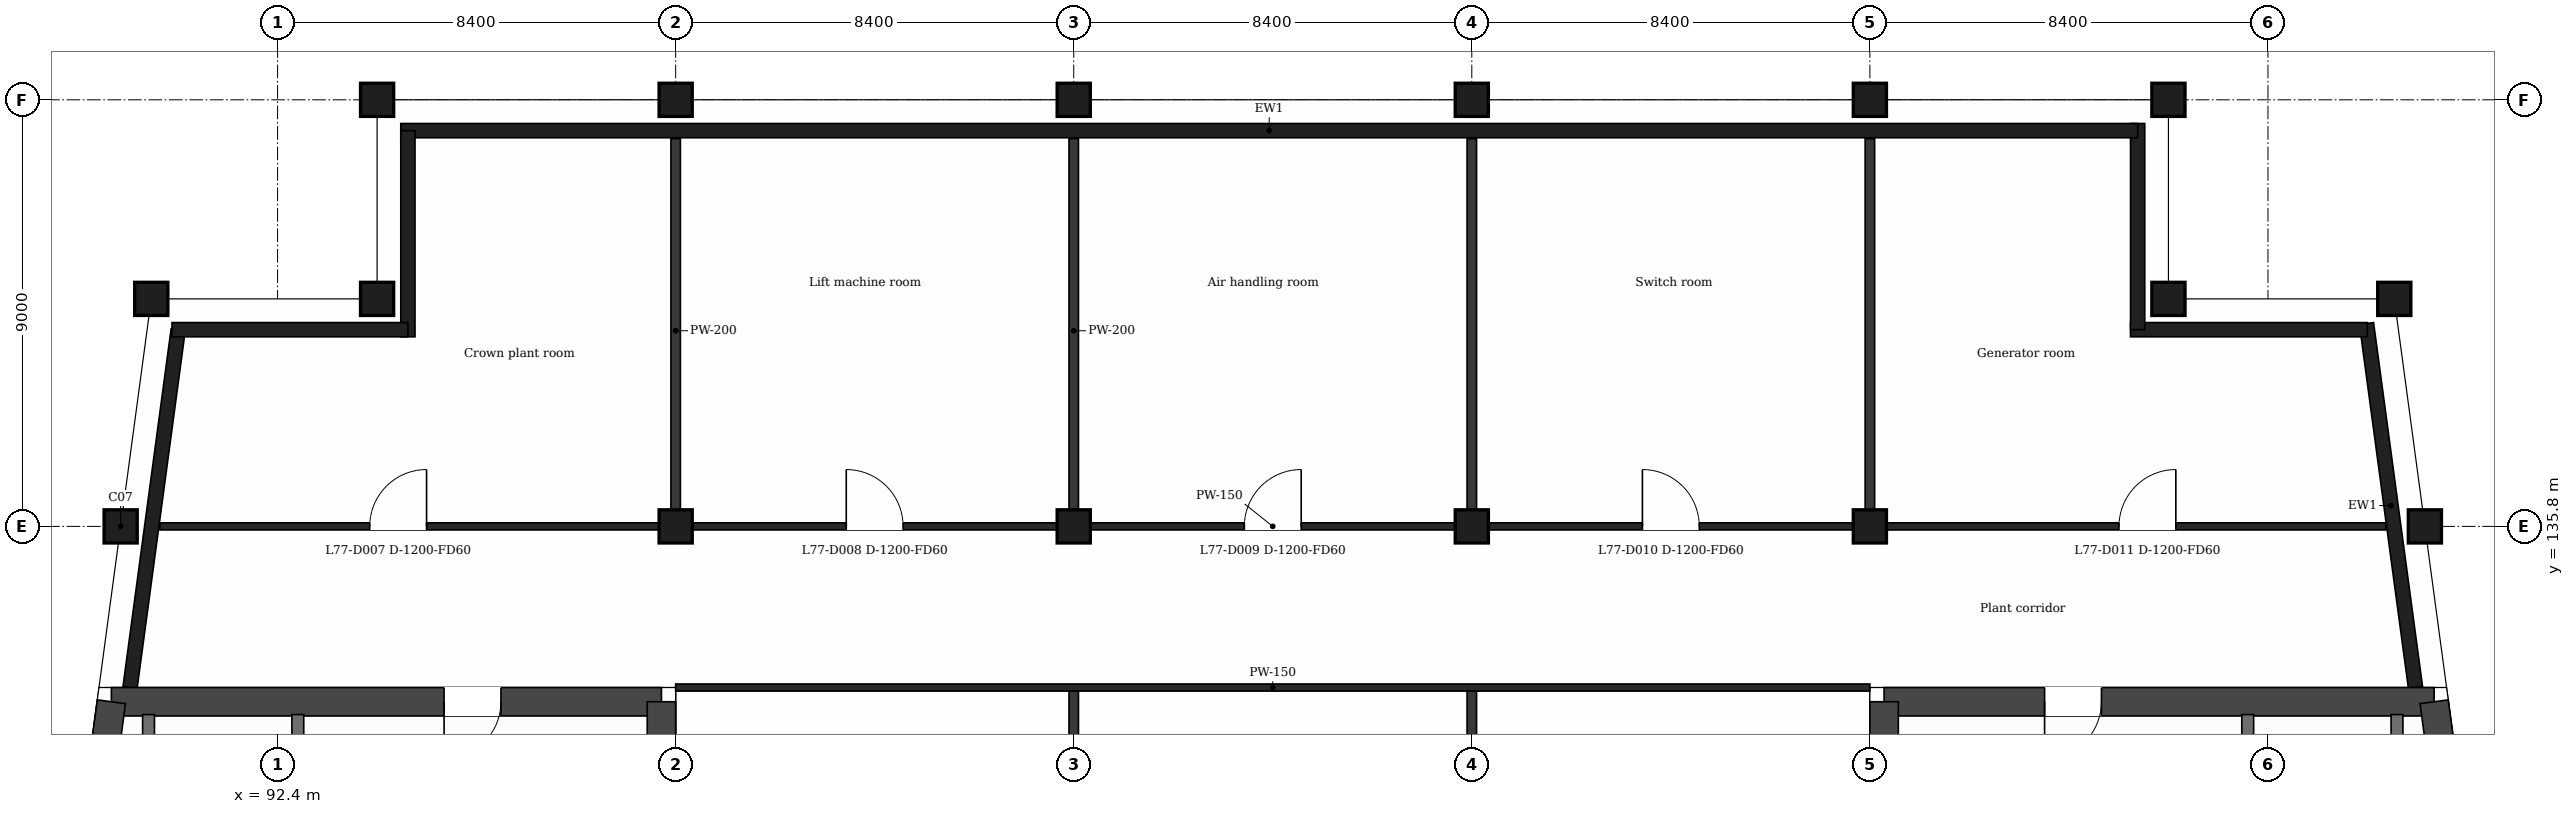
"""IFC4 building model, lengths in metres.
Left out: names, types, materials, properties, quantities, classifications, styles, units other than length and angle.
Written with IfcOpenShell. Run it as: python <this file> out.ifc"""

import sys

from ifc_helpers import new_model, si_unit, direction, frame, frame_2d, origin, origin_2d, place, context, subcontext, project, spatial, polyline, rectangle, outline, extrude, element, fill, save


model = new_model("IFC4")
c1 = context("Model", 3, precision=1e-05, world=origin(), true_north=direction((0.0, 1.0)))
c2 = subcontext(c1, "Body", "Model", "MODEL_VIEW")
j1 = project(units=[si_unit("LENGTHUNIT", "METRE"), si_unit("PLANEANGLEUNIT", "RADIAN")], contexts=[c1])
p1 = place(None, origin())
s1 = spatial("IfcSite", under=j1, at=p1, CompositionType="ELEMENT")
p2 = place(p1, origin())
s2 = spatial("IfcBuilding", under=s1, at=p2, CompositionType="ELEMENT")
p3 = place(p2, frame((0.0, 0.0, 319.9)))
s3 = spatial("IfcBuildingStorey", under=s2, at=p3, CompositionType="ELEMENT", Elevation=319.9)
p4 = place(p3, frame((88.893, 132.1, 0.0), z_axis=(0.0, 0.0, 1.0), x_axis=(1.0, 0.0, 0.0)))
e1 = element("IfcWall", 1, at=p4, inside=s3, PredefinedType="SHEAR", context=c2, shape_type="SweptSolid", body=[
    extrude(outline(polyline([(0.0, 0.0), (11.607, 0.0), (11.607, 9.665), (0.0, 9.665), (0.0, 0.0)])), frame((0.0, 0.3, 0.0), z_axis=(0.0, -1.0, 0.0), x_axis=(1.0, 0.0, 0.0)), (0.0, 0.0, 1.0), 0.6),
])
p5 = place(p4, frame((7.021, 0.0, 0.0)))
e2 = element("IfcOpeningElement", 2, at=p5, cuts=e1, PredefinedType="OPENING", context=c2, shape_type="SweptSolid", body=[
    extrude(rectangle(XDim=1.2, YDim=2.1, at=frame_2d((0.6, 1.05))), frame((0.0, 0.31, 0.0), z_axis=(0.0, -1.0, 0.0), x_axis=(1.0, 0.0, 0.0)), (0.0, 0.0, 1.0), 0.62),
])
p6 = place(p3, frame((100.5, 132.1, 0.0), z_axis=(0.0, 0.0, 1.0), x_axis=(0.0, -1.0, 0.0)))
e3 = element("IfcWall", 3, at=p6, inside=s3, PredefinedType="SHEAR", context=c2, shape_type="SweptSolid", body=[
    extrude(outline(polyline([(0.0, 0.0), (15.8, 0.0), (15.8, 1.162), (9.597, 4.5), (0.0, 9.665), (0.0, 0.0)])), frame((0.0, 0.3, 0.0), z_axis=(0.0, -1.0, 0.0), x_axis=(1.0, 0.0, 0.0)), (0.0, 0.0, 1.0), 0.6),
])
p7 = place(p6, frame((7.95, 0.0, 0.0)))
e4 = element("IfcOpeningElement", 4, at=p7, cuts=e3, PredefinedType="OPENING", context=c2, shape_type="SweptSolid", body=[
    extrude(rectangle(XDim=1.4, YDim=2.1, at=frame_2d((0.7, 1.05))), frame((0.0, 0.31, 0.0), z_axis=(0.0, -1.0, 0.0), x_axis=(1.0, 0.0, 0.0)), (0.0, 0.0, 1.0), 0.62),
])
p8 = place(p3, frame((86.766, 116.3, 0.0), z_axis=(0.0, 0.0, 1.0), x_axis=(0.13341345841, 0.991060466932, 0.0)))
e5 = element("IfcWall", 5, at=p8, inside=s3, PredefinedType="SHEAR", context=c2, shape_type="SweptSolid", body=[
    extrude(outline(polyline([(0.0, 0.0), (15.943, 0.0), (15.943, 9.665), (6.259, 4.5), (0.0, 1.162), (0.0, 0.0)])), frame((0.0, 0.3, 0.0), z_axis=(0.0, -1.0, 0.0), x_axis=(1.0, 0.0, 0.0)), (0.0, 0.0, 1.0), 0.6),
])
p9 = place(p3, frame((126.3, 132.1, 0.0), z_axis=(0.0, 0.0, 1.0), x_axis=(1.0, 0.0, 0.0)))
e6 = element("IfcWall", 6, at=p9, inside=s3, PredefinedType="SHEAR", context=c2, shape_type="SweptSolid", body=[
    extrude(outline(polyline([(0.0, 0.0), (11.607, 0.0), (11.607, 9.665), (0.0, 9.665), (0.0, 0.0)])), frame((0.0, 0.3, 0.0), z_axis=(0.0, -1.0, 0.0), x_axis=(1.0, 0.0, 0.0)), (0.0, 0.0, 1.0), 0.6),
])
p10 = place(p9, frame((3.386, 0.0, 0.0)))
e7 = element("IfcOpeningElement", 7, at=p10, cuts=e6, PredefinedType="OPENING", context=c2, shape_type="SweptSolid", body=[
    extrude(rectangle(XDim=1.2, YDim=2.1, at=frame_2d((0.6, 1.05))), frame((0.0, 0.31, 0.0), z_axis=(0.0, -1.0, 0.0), x_axis=(1.0, 0.0, 0.0)), (0.0, 0.0, 1.0), 0.62),
])
p11 = place(p3, frame((137.907, 132.1, 0.0), z_axis=(0.0, 0.0, 1.0), x_axis=(0.13341345841, -0.991060466932, 0.0)))
e8 = element("IfcWall", 8, at=p11, inside=s3, PredefinedType="SHEAR", context=c2, shape_type="SweptSolid", body=[
    extrude(outline(polyline([(0.0, 0.0), (15.943, 0.0), (15.943, 1.162), (9.683, 4.5), (0.0, 9.665), (0.0, 0.0)])), frame((0.0, 0.3, 0.0), z_axis=(0.0, -1.0, 0.0), x_axis=(1.0, 0.0, 0.0)), (0.0, 0.0, 1.0), 0.6),
])
p12 = place(p3, frame((126.3, 116.3, 0.0), z_axis=(0.0, 0.0, 1.0), x_axis=(0.0, 1.0, 0.0)))
e9 = element("IfcWall", 9, at=p12, inside=s3, PredefinedType="SHEAR", context=c2, shape_type="SweptSolid", body=[
    extrude(outline(polyline([(0.0, 0.0), (15.8, 0.0), (15.8, 9.665), (6.203, 4.5), (0.0, 1.162), (0.0, 0.0)])), frame((0.0, 0.3, 0.0), z_axis=(0.0, -1.0, 0.0), x_axis=(1.0, 0.0, 0.0)), (0.0, 0.0, 1.0), 0.6),
])
p13 = place(p12, frame((6.45, 0.0, 0.0)))
e10 = element("IfcOpeningElement", 10, at=p13, cuts=e9, PredefinedType="OPENING", context=c2, shape_type="SweptSolid", body=[
    extrude(rectangle(XDim=1.4, YDim=2.1, at=frame_2d((0.7, 1.05))), frame((0.0, 0.31, 0.0), z_axis=(0.0, -1.0, 0.0), x_axis=(1.0, 0.0, 0.0)), (0.0, 0.0, 1.0), 0.62),
])
for number, where, z_axis, x_axis in (
    (11, (94.5, 140.6, 0.0), (0.0, 0.0, 1.0), (1.0, 0.0, 0.0)),
    (12, (132.3, 140.6, 0.0), (0.0, 0.0, 1.0), (1.0, 0.0, 0.0)),
    (13, (89.735, 140.6, 0.0), (0.0, 0.0, 1.0), (1.0, 0.0, 0.0)),
    (14, (137.065, 140.6, 0.0), (0.0, 0.0, 1.0), (1.0, 0.0, 0.0)),
    (15, (100.8, 135.8, 0.0), (0.0, 0.0, 1.0), (1.0, 0.0, 0.0)),
    (16, (109.2, 135.8, 0.0), (0.0, 0.0, 1.0), (1.0, 0.0, 0.0)),
    (17, (117.6, 135.8, 0.0), (0.0, 0.0, 1.0), (1.0, 0.0, 0.0)),
    (18, (126.0, 135.8, 0.0), (0.0, 0.0, 1.0), (1.0, 0.0, 0.0)),
    (19, (89.088, 135.8, 0.0), (0.0, 0.0, 1.0), (1.0, 0.0, 0.0)),
    (20, (137.711, 135.8, 0.0), (0.0, 0.0, 1.0), (1.0, 0.0, 0.0)),
    (21, (100.8, 144.8, 0.0), (0.0, 0.0, 1.0), (1.0, 0.0, 0.0)),
    (22, (109.2, 144.8, 0.0), (0.0, 0.0, 1.0), (1.0, 0.0, 0.0)),
    (23, (117.6, 144.8, 0.0), (0.0, 0.0, 1.0), (1.0, 0.0, 0.0)),
    (24, (126.0, 144.8, 0.0), (0.0, 0.0, 1.0), (1.0, 0.0, 0.0)),
    (25, (94.5, 144.8, 0.0), (0.0, 0.0, 1.0), (1.0, 0.0, 0.0)),
    (26, (132.3, 144.8, 0.0), (0.0, 0.0, 1.0), (1.0, 0.0, 0.0)),
):
    element("IfcColumn", number, at=place(p3, frame(where, z_axis=z_axis, x_axis=x_axis)), inside=s3, PredefinedType="COLUMN", context=c2, shape_type="SweptSolid", body=[
        extrude(rectangle(XDim=0.7, YDim=0.7, at=origin_2d()), origin(), (0.0, 0.0, 1.0), 4.5),
    ])
p14 = place(p3, frame((90.303, 139.95, 0.0), z_axis=(0.0, 0.0, 1.0), x_axis=(-0.133412617465, -0.991060580137, 0.0)))
e27 = element("IfcWall", 27, at=p14, inside=s3, PredefinedType="SOLIDWALL", context=c2, shape_type="SweptSolid", body=[
    extrude(rectangle(XDim=7.618, YDim=0.3, at=frame_2d((3.809, 0.0))), origin(), (0.0, 0.0, 1.0), 4.5),
])
p15 = place(p3, frame((137.513, 132.4, 0.0), z_axis=(0.0, 0.0, 1.0), x_axis=(-0.133420343073, 0.991059540116, 0.0)))
e28 = element("IfcWall", 28, at=p15, inside=s3, PredefinedType="SOLIDWALL", context=c2, shape_type="SweptSolid", body=[
    extrude(rectangle(XDim=7.75, YDim=0.3, at=frame_2d((3.875, 0.0))), origin(), (0.0, 0.0, 1.0), 4.5),
])
p16 = place(p3, frame((136.497, 139.95, 0.0), z_axis=(0.0, 0.0, 1.0), x_axis=(-1.0, 0.0, 0.0)))
e29 = element("IfcWall", 29, at=p16, inside=s3, PredefinedType="SOLIDWALL", context=c2, shape_type="SweptSolid", body=[
    extrude(rectangle(XDim=4.997, YDim=0.3, at=frame_2d((2.499, 0.0))), origin(), (0.0, 0.0, 1.0), 4.5),
])
p17 = place(p3, frame((131.65, 139.95, 0.0), z_axis=(0.0, 0.0, 1.0), x_axis=(0.0, 1.0, 0.0)))
e30 = element("IfcWall", 30, at=p17, inside=s3, PredefinedType="SOLIDWALL", context=c2, shape_type="SweptSolid", body=[
    extrude(rectangle(XDim=4.35, YDim=0.3, at=frame_2d((2.175, 0.0))), origin(), (0.0, 0.0, 1.0), 4.5),
])
p18 = place(p3, frame((131.65, 144.15, 0.0), z_axis=(0.0, 0.0, 1.0), x_axis=(-1.0, 0.0, 0.0)))
e31 = element("IfcWall", 31, at=p18, inside=s3, PredefinedType="SOLIDWALL", context=c2, shape_type="SweptSolid", body=[
    extrude(rectangle(XDim=36.65, YDim=0.3, at=frame_2d((18.325, 0.0))), origin(), (0.0, 0.0, 1.0), 4.5),
])
p19 = place(p3, frame((95.15, 144.15, 0.0), z_axis=(0.0, 0.0, 1.0), x_axis=(0.0, -1.0, 0.0)))
e32 = element("IfcWall", 32, at=p19, inside=s3, PredefinedType="SOLIDWALL", context=c2, shape_type="SweptSolid", body=[
    extrude(rectangle(XDim=4.35, YDim=0.3, at=frame_2d((2.175, 0.0))), origin(), (0.0, 0.0, 1.0), 4.5),
])
p20 = place(p3, frame((95.15, 139.95, 0.0), z_axis=(0.0, 0.0, 1.0), x_axis=(-1.0, 0.0, 0.0)))
e33 = element("IfcWall", 33, at=p20, inside=s3, PredefinedType="SOLIDWALL", context=c2, shape_type="SweptSolid", body=[
    extrude(rectangle(XDim=4.978, YDim=0.3, at=frame_2d((2.489, 0.0))), origin(), (0.0, 0.0, 1.0), 4.5),
])
p21 = place(p3, frame((100.8, 132.4, 0.0), z_axis=(0.0, 0.0, 1.0), x_axis=(1.0, 0.0, 0.0)))
e34 = element("IfcWall", 34, at=p21, inside=s3, PredefinedType="PARTITIONING", context=c2, shape_type="SweptSolid", body=[
    extrude(rectangle(XDim=25.2, YDim=0.15, at=frame_2d((12.6, 0.0))), origin(), (0.0, 0.0, 1.0), 4.05),
])
p22 = place(p3, frame((89.916, 135.8, 0.0), z_axis=(0.0, 0.0, 1.0), x_axis=(1.0, 0.0, 0.0)))
e35 = element("IfcWall", 35, at=p22, inside=s3, PredefinedType="PARTITIONING", context=c2, shape_type="SweptSolid", body=[
    extrude(rectangle(XDim=46.968, YDim=0.15, at=frame_2d((23.484, 0.0))), origin(), (0.0, 0.0, 1.0), 4.05),
])
p23 = place(p22, frame((4.428, 0.0, 0.0)))
e36 = element("IfcOpeningElement", 36, at=p23, cuts=e35, PredefinedType="OPENING", context=c2, shape_type="SweptSolid", body=[
    extrude(rectangle(XDim=1.2, YDim=2.1, at=frame_2d((0.6, 1.05))), frame((0.0, 0.085, 0.0), z_axis=(0.0, -1.0, 0.0), x_axis=(1.0, 0.0, 0.0)), (0.0, 0.0, 1.0), 0.17),
])
p24 = place(p22, frame((14.484, 0.0, 0.0)))
e37 = element("IfcOpeningElement", 37, at=p24, cuts=e35, PredefinedType="OPENING", context=c2, shape_type="SweptSolid", body=[
    extrude(rectangle(XDim=1.2, YDim=2.1, at=frame_2d((0.6, 1.05))), frame((0.0, 0.085, 0.0), z_axis=(0.0, -1.0, 0.0), x_axis=(1.0, 0.0, 0.0)), (0.0, 0.0, 1.0), 0.17),
])
p25 = place(p22, frame((22.884, 0.0, 0.0)))
e38 = element("IfcOpeningElement", 38, at=p25, cuts=e35, PredefinedType="OPENING", context=c2, shape_type="SweptSolid", body=[
    extrude(rectangle(XDim=1.2, YDim=2.1, at=frame_2d((0.6, 1.05))), frame((0.0, 0.085, 0.0), z_axis=(0.0, -1.0, 0.0), x_axis=(1.0, 0.0, 0.0)), (0.0, 0.0, 1.0), 0.17),
])
p26 = place(p22, frame((31.284, 0.0, 0.0)))
e39 = element("IfcOpeningElement", 39, at=p26, cuts=e35, PredefinedType="OPENING", context=c2, shape_type="SweptSolid", body=[
    extrude(rectangle(XDim=1.2, YDim=2.1, at=frame_2d((0.6, 1.05))), frame((0.0, 0.085, 0.0), z_axis=(0.0, -1.0, 0.0), x_axis=(1.0, 0.0, 0.0)), (0.0, 0.0, 1.0), 0.17),
])
p27 = place(p22, frame((41.34, 0.0, 0.0)))
e40 = element("IfcOpeningElement", 40, at=p27, cuts=e35, PredefinedType="OPENING", context=c2, shape_type="SweptSolid", body=[
    extrude(rectangle(XDim=1.2, YDim=2.1, at=frame_2d((0.6, 1.05))), frame((0.0, 0.085, 0.0), z_axis=(0.0, -1.0, 0.0), x_axis=(1.0, 0.0, 0.0)), (0.0, 0.0, 1.0), 0.17),
])
p28 = place(p3, frame((89.677, 124.575, 0.0), z_axis=(0.0, 0.0, 1.0), x_axis=(0.0, 1.0, 0.0)))
e41 = element("IfcWall", 41, at=p28, inside=s3, PredefinedType="PARTITIONING", context=c2, shape_type="SweptSolid", body=[
    extrude(rectangle(XDim=7.255, YDim=0.25, at=frame_2d((3.627, 0.0))), origin(), (0.0, 0.0, 1.0), 4.05),
])
p29 = place(p3, frame((92.827, 124.575, 0.0), z_axis=(0.0, 0.0, 1.0), x_axis=(0.0, 1.0, 0.0)))
e42 = element("IfcWall", 42, at=p29, inside=s3, PredefinedType="PARTITIONING", context=c2, shape_type="SweptSolid", body=[
    extrude(rectangle(XDim=7.255, YDim=0.25, at=frame_2d((3.627, 0.0))), origin(), (0.0, 0.0, 1.0), 4.05),
])
p30 = place(p29, frame((5.325, 0.0, 0.0)))
e43 = element("IfcOpeningElement", 43, at=p30, cuts=e42, PredefinedType="OPENING", context=c2, shape_type="SweptSolid", body=[
    extrude(rectangle(XDim=1.0, YDim=2.1, at=frame_2d((0.5, 1.05))), frame((0.0, 0.135, 0.0), z_axis=(0.0, -1.0, 0.0), x_axis=(1.0, 0.0, 0.0)), (0.0, 0.0, 1.0), 0.27),
])
p31 = place(p3, frame((100.8, 135.875, 0.0), z_axis=(0.0, 0.0, 1.0), x_axis=(0.0, 1.0, 0.0)))
e44 = element("IfcWall", 44, at=p31, inside=s3, PredefinedType="PARTITIONING", context=c2, shape_type="SweptSolid", body=[
    extrude(rectangle(XDim=8.105, YDim=0.2, at=frame_2d((4.052, 0.0))), origin(), (0.0, 0.0, 1.0), 4.05),
])
p32 = place(p3, frame((109.2, 125.175, 0.0), z_axis=(0.0, 0.0, 1.0), x_axis=(0.0, 1.0, 0.0)))
e45 = element("IfcWall", 45, at=p32, inside=s3, PredefinedType="PARTITIONING", context=c2, shape_type="SweptSolid", body=[
    extrude(rectangle(XDim=7.15, YDim=0.2, at=frame_2d((3.575, 0.0))), origin(), (0.0, 0.0, 1.0), 4.05),
])
p33 = place(p3, frame((109.2, 135.875, 0.0), z_axis=(0.0, 0.0, 1.0), x_axis=(0.0, 1.0, 0.0)))
e46 = element("IfcWall", 46, at=p33, inside=s3, PredefinedType="PARTITIONING", context=c2, shape_type="SweptSolid", body=[
    extrude(rectangle(XDim=8.105, YDim=0.2, at=frame_2d((4.052, 0.0))), origin(), (0.0, 0.0, 1.0), 4.05),
])
p34 = place(p3, frame((117.6, 125.175, 0.0), z_axis=(0.0, 0.0, 1.0), x_axis=(0.0, 1.0, 0.0)))
e47 = element("IfcWall", 47, at=p34, inside=s3, PredefinedType="PARTITIONING", context=c2, shape_type="SweptSolid", body=[
    extrude(rectangle(XDim=7.15, YDim=0.2, at=frame_2d((3.575, 0.0))), origin(), (0.0, 0.0, 1.0), 4.05),
])
for number, where, z_axis, x_axis in (
    (48, (117.6, 135.875, 0.0), (0.0, 0.0, 1.0), (0.0, 1.0, 0.0)),
    (49, (126.0, 135.875, 0.0), (0.0, 0.0, 1.0), (0.0, 1.0, 0.0)),
):
    element("IfcWall", number, at=place(p3, frame(where, z_axis=z_axis, x_axis=x_axis)), inside=s3, PredefinedType="PARTITIONING", context=c2, shape_type="SweptSolid", body=[
        extrude(rectangle(XDim=8.105, YDim=0.2, at=frame_2d((4.052, 0.0))), origin(), (0.0, 0.0, 1.0), 4.05),
    ])
p35 = place(p3, frame((133.973, 124.575, 0.0), z_axis=(0.0, 0.0, 1.0), x_axis=(0.0, 1.0, 0.0)))
e50 = element("IfcWall", 50, at=p35, inside=s3, PredefinedType="PARTITIONING", context=c2, shape_type="SweptSolid", body=[
    extrude(rectangle(XDim=7.255, YDim=0.25, at=frame_2d((3.627, 0.0))), origin(), (0.0, 0.0, 1.0), 4.05),
])
p36 = place(p35, frame((5.325, 0.0, 0.0)))
e51 = element("IfcOpeningElement", 51, at=p36, cuts=e50, PredefinedType="OPENING", context=c2, shape_type="SweptSolid", body=[
    extrude(rectangle(XDim=1.0, YDim=2.1, at=frame_2d((0.5, 1.05))), frame((0.0, 0.135, 0.0), z_axis=(0.0, -1.0, 0.0), x_axis=(1.0, 0.0, 0.0)), (0.0, 0.0, 1.0), 0.27),
])
p37 = place(p3, frame((137.123, 124.575, 0.0), z_axis=(0.0, 0.0, 1.0), x_axis=(0.0, 1.0, 0.0)))
e52 = element("IfcWall", 52, at=p37, inside=s3, PredefinedType="PARTITIONING", context=c2, shape_type="SweptSolid", body=[
    extrude(rectangle(XDim=7.255, YDim=0.25, at=frame_2d((3.627, 0.0))), origin(), (0.0, 0.0, 1.0), 4.05),
])
p38 = place(p23, origin())
e53 = element("IfcDoor", 53, at=p38, inside=s3, OperationType="SINGLE_SWING_RIGHT", PredefinedType="DOOR", context=c2, shape_type="SweptSolid", body=[
    extrude(rectangle(XDim=1.2, YDim=2.1, at=frame_2d((0.6, 1.05))), frame((0.0, 0.025, 0.0), z_axis=(0.0, -1.0, 0.0), x_axis=(1.0, 0.0, 0.0)), (0.0, 0.0, 1.0), 0.05),
])
fill(e36, e53)
p39 = place(p24, origin())
e54 = element("IfcDoor", 54, at=p39, inside=s3, OperationType="SINGLE_SWING_LEFT", PredefinedType="DOOR", context=c2, shape_type="SweptSolid", body=[
    extrude(rectangle(XDim=1.2, YDim=2.1, at=frame_2d((0.6, 1.05))), frame((0.0, 0.025, 0.0), z_axis=(0.0, -1.0, 0.0), x_axis=(1.0, 0.0, 0.0)), (0.0, 0.0, 1.0), 0.05),
])
fill(e37, e54)
p40 = place(p25, origin())
e55 = element("IfcDoor", 55, at=p40, inside=s3, OperationType="SINGLE_SWING_RIGHT", PredefinedType="DOOR", context=c2, shape_type="SweptSolid", body=[
    extrude(rectangle(XDim=1.2, YDim=2.1, at=frame_2d((0.6, 1.05))), frame((0.0, 0.025, 0.0), z_axis=(0.0, -1.0, 0.0), x_axis=(1.0, 0.0, 0.0)), (0.0, 0.0, 1.0), 0.05),
])
fill(e38, e55)
p41 = place(p26, origin())
e56 = element("IfcDoor", 56, at=p41, inside=s3, OperationType="SINGLE_SWING_LEFT", PredefinedType="DOOR", context=c2, shape_type="SweptSolid", body=[
    extrude(rectangle(XDim=1.2, YDim=2.1, at=frame_2d((0.6, 1.05))), frame((0.0, 0.025, 0.0), z_axis=(0.0, -1.0, 0.0), x_axis=(1.0, 0.0, 0.0)), (0.0, 0.0, 1.0), 0.05),
])
fill(e39, e56)
p42 = place(p27, origin())
e57 = element("IfcDoor", 57, at=p42, inside=s3, OperationType="SINGLE_SWING_RIGHT", PredefinedType="DOOR", context=c2, shape_type="SweptSolid", body=[
    extrude(rectangle(XDim=1.2, YDim=2.1, at=frame_2d((0.6, 1.05))), frame((0.0, 0.025, 0.0), z_axis=(0.0, -1.0, 0.0), x_axis=(1.0, 0.0, 0.0)), (0.0, 0.0, 1.0), 0.05),
])
fill(e40, e57)
p43 = place(p5, origin())
e58 = element("IfcDoor", 58, at=p43, inside=s3, OperationType="SINGLE_SWING_LEFT", PredefinedType="DOOR", context=c2, shape_type="SweptSolid", body=[
    extrude(rectangle(XDim=1.2, YDim=2.1, at=frame_2d((0.6, 1.05))), frame((0.0, 0.025, 0.0), z_axis=(0.0, -1.0, 0.0), x_axis=(1.0, 0.0, 0.0)), (0.0, 0.0, 1.0), 0.05),
])
fill(e2, e58)
p44 = place(p10, origin())
e59 = element("IfcDoor", 59, at=p44, inside=s3, OperationType="SINGLE_SWING_LEFT", PredefinedType="DOOR", context=c2, shape_type="SweptSolid", body=[
    extrude(rectangle(XDim=1.2, YDim=2.1, at=frame_2d((0.6, 1.05))), frame((0.0, 0.025, 0.0), z_axis=(0.0, -1.0, 0.0), x_axis=(1.0, 0.0, 0.0)), (0.0, 0.0, 1.0), 0.05),
])
fill(e7, e59)
save(model, sys.argv[1])
